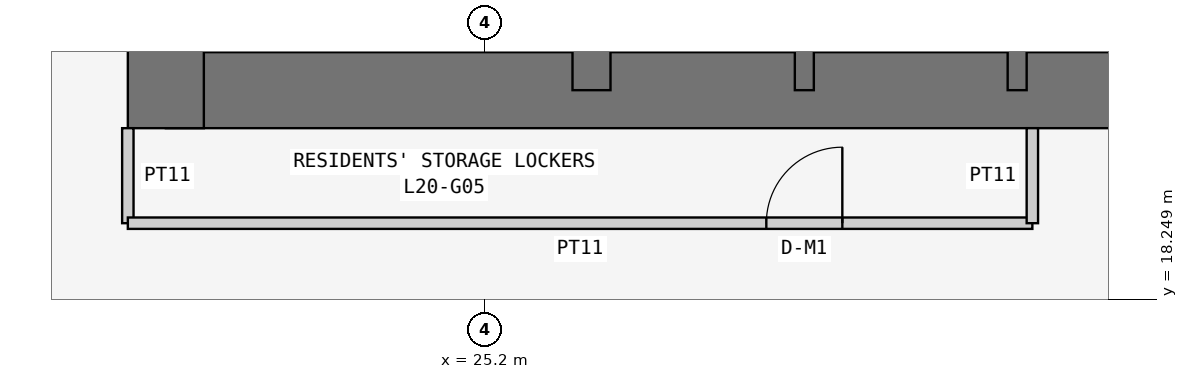
"""IFC4 building model, lengths in metres.
Left out: names, types, materials, properties, quantities, classifications, styles, units other than length and angle.
Written with IfcOpenShell. Run it as: python <this file> out.ifc"""

import sys

from ifc_helpers import new_model, si_unit, direction, frame, frame_2d, origin, place, context, subcontext, project, spatial, rectangle, extrude, element, fill, save


model = new_model("IFC4")
c1 = context("Model", 3, precision=1e-05, world=origin(), true_north=direction((0.0, 1.0)))
c2 = subcontext(c1, "Body", "Model", "MODEL_VIEW")
j1 = project(units=[si_unit("LENGTHUNIT", "METRE"), si_unit("PLANEANGLEUNIT", "RADIAN")], contexts=[c1])
p1 = place(None, origin())
s1 = spatial("IfcSite", under=j1, at=p1, CompositionType="ELEMENT")
p2 = place(p1, origin())
s2 = spatial("IfcBuilding", under=s1, at=p2, CompositionType="ELEMENT")
p3 = place(p2, frame((0.0, 0.0, 81.3)))
s3 = spatial("IfcBuildingStorey", under=s2, at=p3, CompositionType="ELEMENT", Elevation=81.3)
p4 = place(p3, frame((21.0, 21.0, 0.0), z_axis=(0.0, 0.0, 1.0), x_axis=(1.0, 0.0, 0.0)))
e1 = element("IfcWall", 1, at=p4, inside=s3, PredefinedType="SHEAR", context=c2, shape_type="SweptSolid", body=[
    extrude(rectangle(XDim=17.3, YDim=1.0, at=frame_2d((8.65, 0.0))), origin(), (0.0, 0.0, 1.0), 3.6),
])
p5 = place(p3, frame((21.0, 37.8, 0.0), z_axis=(0.0, 0.0, 1.0), x_axis=(0.0, -1.0, 0.0)))
e2 = element("IfcWall", 2, at=p5, inside=s3, PredefinedType="SHEAR", context=c2, shape_type="SweptSolid", body=[
    extrude(rectangle(XDim=17.3, YDim=1.0, at=frame_2d((8.65, 0.0))), origin(), (0.0, 0.0, 1.0), 3.6),
])
p6 = place(p5, frame((5.4, 0.0, 0.0)))
e3 = element("IfcOpeningElement", 3, at=p6, cuts=e2, PredefinedType="OPENING", context=c2, shape_type="SweptSolid", body=[
    extrude(rectangle(XDim=1.2, YDim=2.1, at=frame_2d((0.6, 1.05))), frame((0.0, 0.51, 0.0), z_axis=(0.0, -1.0, 0.0), x_axis=(1.0, 0.0, 0.0)), (0.0, 0.0, 1.0), 1.02),
])
p7 = place(p3, frame((26.6, 21.0, 0.0), z_axis=(0.0, 0.0, 1.0), x_axis=(0.0, 1.0, 0.0)))
e4 = element("IfcWall", 4, at=p7, inside=s3, PredefinedType="SHEAR", context=c2, shape_type="SweptSolid", body=[
    extrude(rectangle(XDim=16.8, YDim=0.5, at=frame_2d((8.4, 0.0))), origin(), (0.0, 0.0, 1.0), 3.6),
])
p8 = place(p7, frame((10.4, 0.0, 0.0)))
e5 = element("IfcOpeningElement", 5, at=p8, cuts=e4, PredefinedType="OPENING", context=c2, shape_type="SweptSolid", body=[
    extrude(rectangle(XDim=1.2, YDim=2.1, at=frame_2d((0.6, 1.05))), frame((0.0, 0.26, 0.0), z_axis=(0.0, -1.0, 0.0), x_axis=(1.0, 0.0, 0.0)), (0.0, 0.0, 1.0), 0.52),
])
for number, where, z_axis, x_axis in (
    (6, (29.4, 21.0, 0.0), (0.0, 0.0, 1.0), (0.0, 1.0, 0.0)),
    (7, (32.2, 21.0, 0.0), (0.0, 0.0, 1.0), (0.0, 1.0, 0.0)),
):
    element("IfcWall", number, at=place(p3, frame(where, z_axis=z_axis, x_axis=x_axis)), inside=s3, PredefinedType="SHEAR", context=c2, shape_type="SweptSolid", body=[
        extrude(rectangle(XDim=3.2, YDim=0.25, at=frame_2d((1.6, 0.0))), origin(), (0.0, 0.0, 1.0), 3.6),
    ])
p9 = place(p3, frame((20.5, 20.5, 0.0), z_axis=(0.0, 0.0, 1.0), x_axis=(0.0, -1.0, 0.0)))
e8 = element("IfcWall", 8, at=p9, inside=s3, PredefinedType="PARTITIONING", context=c2, shape_type="SweptSolid", body=[
    extrude(rectangle(XDim=1.25, YDim=0.15, at=frame_2d((0.625, 0.0))), origin(), (0.0, 0.0, 1.0), 3.45),
])
p10 = place(p3, frame((20.5, 19.25, 0.0), z_axis=(0.0, 0.0, 1.0), x_axis=(1.0, 0.0, 0.0)))
e9 = element("IfcWall", 9, at=p10, inside=s3, PredefinedType="PARTITIONING", context=c2, shape_type="SweptSolid", body=[
    extrude(rectangle(XDim=11.9, YDim=0.15, at=frame_2d((5.95, 0.0))), origin(), (0.0, 0.0, 1.0), 3.45),
])
p11 = place(p10, frame((8.4, 0.0, 0.0)))
e10 = element("IfcOpeningElement", 10, at=p11, cuts=e9, PredefinedType="OPENING", context=c2, shape_type="SweptSolid", body=[
    extrude(rectangle(XDim=1.0, YDim=2.1, at=frame_2d((0.5, 1.05))), frame((0.0, 0.085, 0.0), z_axis=(0.0, -1.0, 0.0), x_axis=(1.0, 0.0, 0.0)), (0.0, 0.0, 1.0), 0.17),
])
p12 = place(p3, frame((32.4, 19.25, 0.0), z_axis=(0.0, 0.0, 1.0), x_axis=(0.0, 1.0, 0.0)))
e11 = element("IfcWall", 11, at=p12, inside=s3, PredefinedType="PARTITIONING", context=c2, shape_type="SweptSolid", body=[
    extrude(rectangle(XDim=1.25, YDim=0.15, at=frame_2d((0.625, 0.0))), origin(), (0.0, 0.0, 1.0), 3.45),
])
p13 = place(p11, origin())
e12 = element("IfcDoor", 12, at=p13, inside=s3, OperationType="SINGLE_SWING_RIGHT", PredefinedType="DOOR", context=c2, shape_type="SweptSolid", body=[
    extrude(rectangle(XDim=1.0, YDim=2.1, at=frame_2d((0.5, 1.05))), frame((0.0, 0.025, 0.0), z_axis=(0.0, -1.0, 0.0), x_axis=(1.0, 0.0, 0.0)), (0.0, 0.0, 1.0), 0.05),
])
fill(e10, e12)
save(model, sys.argv[1])
